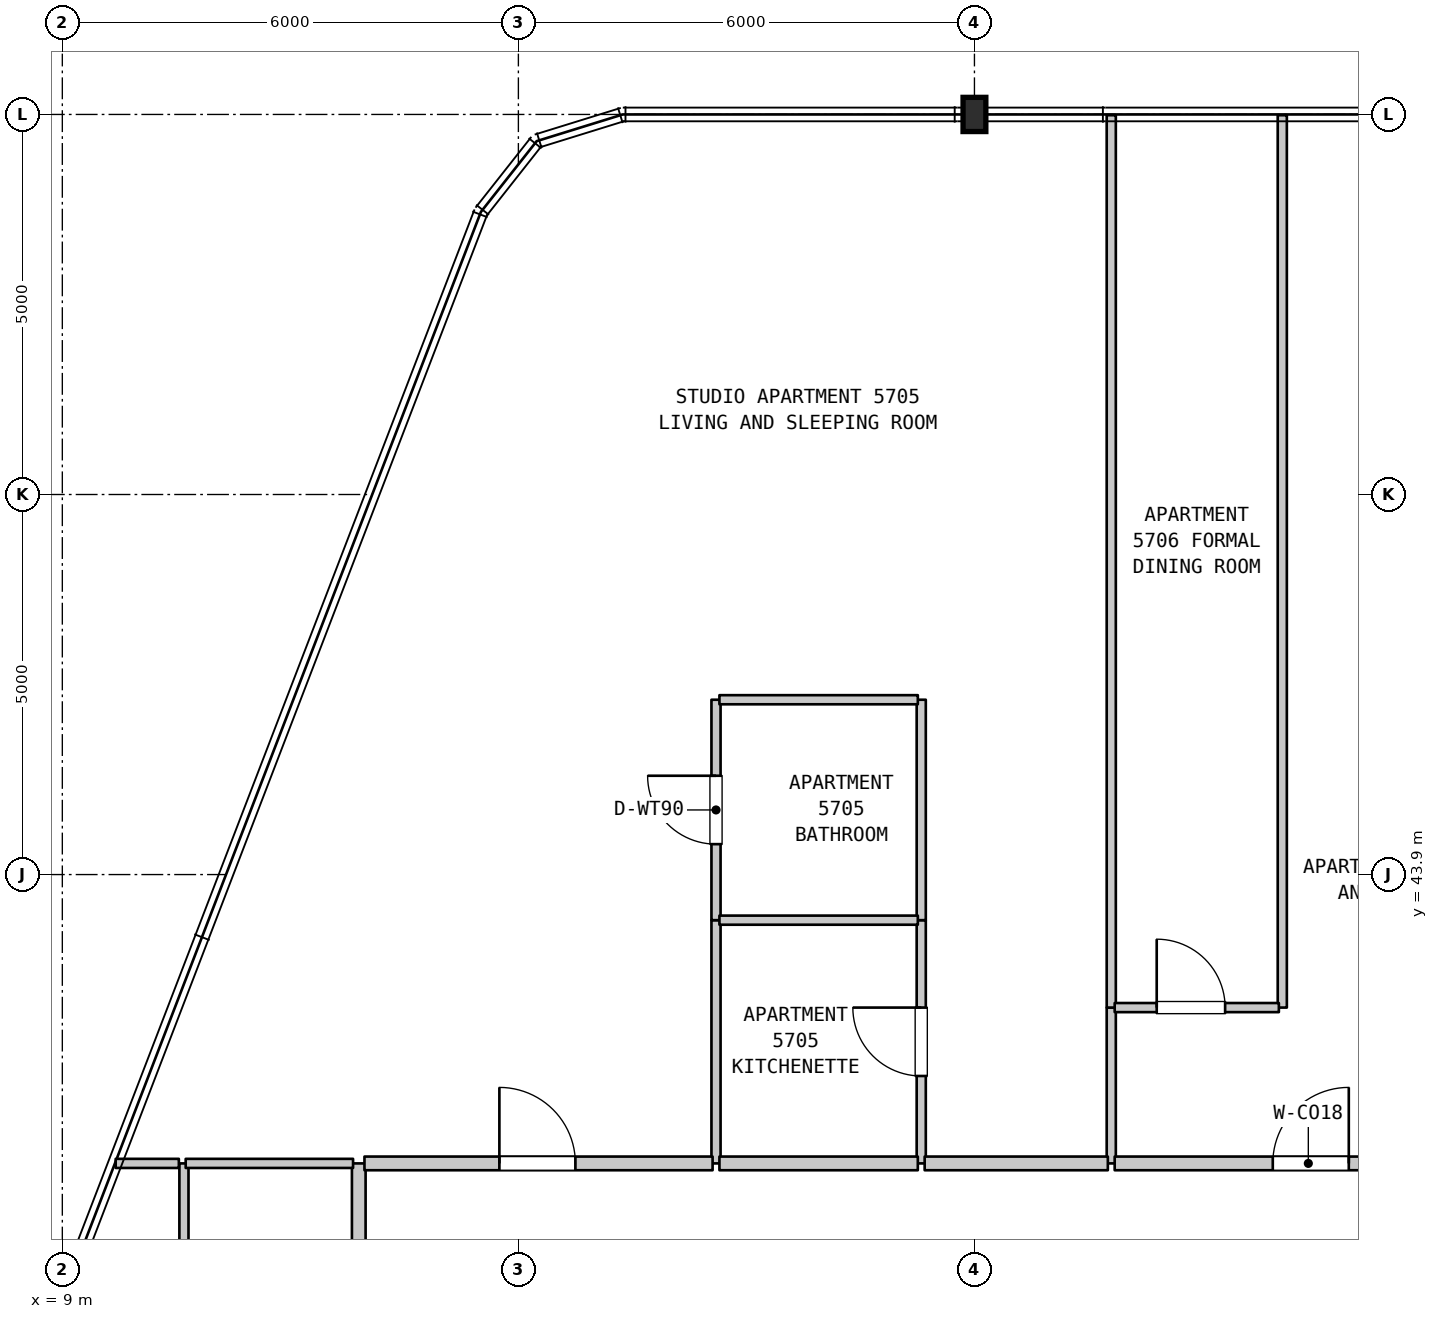
"""IFC4 building model, lengths in metres.
Left out: names, types, materials, properties, quantities, classifications, styles, units other than length and angle.
Written with IfcOpenShell. Run it as: python <this file> out.ifc"""

import sys

from ifc_helpers import new_model, si_unit, direction, frame, frame_2d, origin, origin_2d, place, context, subcontext, project, spatial, rectangle, i_section, extrude, element, fill, save


model = new_model("IFC4")
c1 = context("Model", 3, precision=1e-05, world=origin(), true_north=direction((0.0, 1.0)))
c2 = subcontext(c1, "Body", "Model", "MODEL_VIEW")
j1 = project(units=[si_unit("LENGTHUNIT", "METRE"), si_unit("PLANEANGLEUNIT", "RADIAN")], contexts=[c1])
p1 = place(None, origin())
s1 = spatial("IfcSite", under=j1, at=p1, CompositionType="ELEMENT")
p2 = place(p1, origin())
s2 = spatial("IfcBuilding", under=s1, at=p2, CompositionType="ELEMENT")
p3 = place(p2, frame((0.0, 0.0, 230.2)))
s3 = spatial("IfcBuildingStorey", under=s2, at=p3, CompositionType="ELEMENT", Elevation=230.2)
p4 = place(p3, frame((21.0, 53.9, 0.0), z_axis=(0.0, 0.0, 1.0), x_axis=(1.0, 0.0, 0.0)))
e1 = element("IfcColumn", 1, at=p4, inside=s3, PredefinedType="COLUMN", context=c2, shape_type="SweptSolid", body=[
    extrude(i_section(OverallWidth=0.3, OverallDepth=0.45, WebThickness=0.014, FlangeThickness=0.026, FilletRadius=0.027, at=origin_2d()), origin(), (0.0, 0.0, 1.0), 3.7),
])
p5 = place(p3, frame((10.6, 35.59, 0.0), z_axis=(0.0, 0.0, 1.0), x_axis=(0.0, 1.0, 0.0)))
e2 = element("IfcWall", 2, at=p5, inside=s3, PredefinedType="PARTITIONING", context=c2, shape_type="SweptSolid", body=[
    extrude(rectangle(XDim=4.51, YDim=0.12, at=frame_2d((2.255, 0.0))), origin(), (0.0, 0.0, 1.0), 3.39),
])
p6 = place(p3, frame((12.9, 35.59, 0.0), z_axis=(0.0, 0.0, 1.0), x_axis=(0.0, 1.0, 0.0)))
e3 = element("IfcWall", 3, at=p6, inside=s3, PredefinedType="STANDARD", context=c2, shape_type="SweptSolid", body=[
    extrude(rectangle(XDim=4.51, YDim=0.18, at=frame_2d((2.255, 0.0))), origin(), (0.0, 0.0, 1.0), 3.39),
])
p7 = place(p3, frame((17.6, 40.1, 0.0), z_axis=(0.0, 0.0, 1.0), x_axis=(0.0, 1.0, 0.0)))
e4 = element("IfcWall", 4, at=p7, inside=s3, PredefinedType="PARTITIONING", context=c2, shape_type="SweptSolid", body=[
    extrude(rectangle(XDim=3.2, YDim=0.12, at=frame_2d((1.6, 0.0))), origin(), (0.0, 0.0, 1.0), 3.39),
])
p8 = place(p3, frame((17.6, 43.3, 0.0), z_axis=(0.0, 0.0, 1.0), x_axis=(0.0, 1.0, 0.0)))
e5 = element("IfcWall", 5, at=p8, inside=s3, PredefinedType="PARTITIONING", context=c2, shape_type="SweptSolid", body=[
    extrude(rectangle(XDim=2.9, YDim=0.12, at=frame_2d((1.45, 0.0))), origin(), (0.0, 0.0, 1.0), 3.39),
])
p9 = place(p8, frame((1.0, 0.0, 0.0)))
e6 = element("IfcOpeningElement", 6, at=p9, cuts=e5, PredefinedType="OPENING", context=c2, shape_type="SweptSolid", body=[
    extrude(rectangle(XDim=0.9, YDim=2.1, at=frame_2d((0.45, 1.05))), frame((0.0, 0.07, 0.0), z_axis=(0.0, -1.0, 0.0), x_axis=(1.0, 0.0, 0.0)), (0.0, 0.0, 1.0), 0.14),
])
p10 = place(p3, frame((20.3, 40.1, 0.0), z_axis=(0.0, 0.0, 1.0), x_axis=(0.0, 1.0, 0.0)))
e7 = element("IfcWall", 7, at=p10, inside=s3, PredefinedType="PARTITIONING", context=c2, shape_type="SweptSolid", body=[
    extrude(rectangle(XDim=3.2, YDim=0.12, at=frame_2d((1.6, 0.0))), origin(), (0.0, 0.0, 1.0), 3.39),
])
p11 = place(p10, frame((1.15, 0.0, 0.0)))
e8 = element("IfcOpeningElement", 8, at=p11, cuts=e7, PredefinedType="OPENING", context=c2, shape_type="SweptSolid", body=[
    extrude(rectangle(XDim=0.9, YDim=2.15, at=frame_2d((0.45, 1.075))), frame((0.0, 0.07, 0.0), z_axis=(0.0, -1.0, 0.0), x_axis=(1.0, 0.0, 0.0)), (0.0, 0.0, 1.0), 0.14),
])
p12 = place(p3, frame((20.3, 43.3, 0.0), z_axis=(0.0, 0.0, 1.0), x_axis=(0.0, 1.0, 0.0)))
e9 = element("IfcWall", 9, at=p12, inside=s3, PredefinedType="PARTITIONING", context=c2, shape_type="SweptSolid", body=[
    extrude(rectangle(XDim=2.9, YDim=0.12, at=frame_2d((1.45, 0.0))), origin(), (0.0, 0.0, 1.0), 3.39),
])
p13 = place(p3, frame((22.8, 40.1, 0.0), z_axis=(0.0, 0.0, 1.0), x_axis=(0.0, 1.0, 0.0)))
e10 = element("IfcWall", 10, at=p13, inside=s3, PredefinedType="PARTITIONING", context=c2, shape_type="SweptSolid", body=[
    extrude(rectangle(XDim=2.05, YDim=0.12, at=frame_2d((1.025, 0.0))), origin(), (0.0, 0.0, 1.0), 3.39),
])
for number, where, z_axis, x_axis in (
    (11, (22.8, 42.15, 0.0), (0.0, 0.0, 1.0), (0.0, 1.0, 0.0)),
    (12, (25.05, 42.15, 0.0), (0.0, 0.0, 1.0), (0.0, 1.0, 0.0)),
):
    element("IfcWall", number, at=place(p3, frame(where, z_axis=z_axis, x_axis=x_axis)), inside=s3, PredefinedType="PARTITIONING", context=c2, shape_type="SweptSolid", body=[
        extrude(rectangle(XDim=11.74, YDim=0.12, at=frame_2d((5.87, 0.0))), origin(), (0.0, 0.0, 1.0), 3.39),
    ])
p14 = place(p3, frame((9.702, 40.1, 0.0), z_axis=(0.0, 0.0, 1.0), x_axis=(1.0, 0.0, 0.0)))
e13 = element("IfcWall", 13, at=p14, inside=s3, PredefinedType="PARTITIONING", context=c2, shape_type="SweptSolid", body=[
    extrude(rectangle(XDim=0.831, YDim=0.12, at=frame_2d((0.416, 0.0))), origin(), (0.0, 0.0, 1.0), 3.39),
])
p15 = place(p3, frame((10.623, 40.1, 0.0), z_axis=(0.0, 0.0, 1.0), x_axis=(1.0, 0.0, 0.0)))
e14 = element("IfcWall", 14, at=p15, inside=s3, PredefinedType="PARTITIONING", context=c2, shape_type="SweptSolid", body=[
    extrude(rectangle(XDim=2.202, YDim=0.12, at=frame_2d((1.101, 0.0))), origin(), (0.0, 0.0, 1.0), 3.39),
])
p16 = place(p3, frame((12.975, 40.1, 0.0), z_axis=(0.0, 0.0, 1.0), x_axis=(1.0, 0.0, 0.0)))
e15 = element("IfcWall", 15, at=p16, inside=s3, PredefinedType="STANDARD", context=c2, shape_type="SweptSolid", body=[
    extrude(rectangle(XDim=4.58, YDim=0.18, at=frame_2d((2.29, 0.0))), origin(), (0.0, 0.0, 1.0), 3.39),
])
p17 = place(p16, frame((1.775, 0.0, 0.0)))
e16 = element("IfcOpeningElement", 16, at=p17, cuts=e15, PredefinedType="OPENING", context=c2, shape_type="SweptSolid", body=[
    extrude(rectangle(XDim=1.0, YDim=2.15, at=frame_2d((0.5, 1.075))), frame((0.0, 0.1, 0.0), z_axis=(0.0, -1.0, 0.0), x_axis=(1.0, 0.0, 0.0)), (0.0, 0.0, 1.0), 0.2),
])
p18 = place(p3, frame((17.645, 40.1, 0.0), z_axis=(0.0, 0.0, 1.0), x_axis=(1.0, 0.0, 0.0)))
e17 = element("IfcWall", 17, at=p18, inside=s3, PredefinedType="STANDARD", context=c2, shape_type="SweptSolid", body=[
    extrude(rectangle(XDim=2.61, YDim=0.18, at=frame_2d((1.305, 0.0))), origin(), (0.0, 0.0, 1.0), 3.39),
])
p19 = place(p3, frame((20.345, 40.1, 0.0), z_axis=(0.0, 0.0, 1.0), x_axis=(1.0, 0.0, 0.0)))
e18 = element("IfcWall", 18, at=p19, inside=s3, PredefinedType="STANDARD", context=c2, shape_type="SweptSolid", body=[
    extrude(rectangle(XDim=2.41, YDim=0.18, at=frame_2d((1.205, 0.0))), origin(), (0.0, 0.0, 1.0), 3.39),
])
p20 = place(p3, frame((22.845, 40.1, 0.0), z_axis=(0.0, 0.0, 1.0), x_axis=(1.0, 0.0, 0.0)))
e19 = element("IfcWall", 19, at=p20, inside=s3, PredefinedType="STANDARD", context=c2, shape_type="SweptSolid", body=[
    extrude(rectangle(XDim=5.095, YDim=0.18, at=frame_2d((2.547, 0.0))), origin(), (0.0, 0.0, 1.0), 3.39),
])
p21 = place(p20, frame((2.08, 0.0, 0.0)))
e20 = element("IfcOpeningElement", 20, at=p21, cuts=e19, PredefinedType="OPENING", context=c2, shape_type="SweptSolid", body=[
    extrude(rectangle(XDim=1.0, YDim=2.15, at=frame_2d((0.5, 1.075))), frame((0.0, 0.1, 0.0), z_axis=(0.0, -1.0, 0.0), x_axis=(1.0, 0.0, 0.0)), (0.0, 0.0, 1.0), 0.2),
])
p22 = place(p3, frame((22.845, 42.15, 0.0), z_axis=(0.0, 0.0, 1.0), x_axis=(1.0, 0.0, 0.0)))
e21 = element("IfcWall", 21, at=p22, inside=s3, PredefinedType="PARTITIONING", context=c2, shape_type="SweptSolid", body=[
    extrude(rectangle(XDim=2.16, YDim=0.12, at=frame_2d((1.08, 0.0))), origin(), (0.0, 0.0, 1.0), 3.39),
])
p23 = place(p22, frame((0.553, 0.0, 0.0)))
e22 = element("IfcOpeningElement", 22, at=p23, cuts=e21, PredefinedType="OPENING", context=c2, shape_type="SweptSolid", body=[
    extrude(rectangle(XDim=0.9, YDim=2.15, at=frame_2d((0.45, 1.075))), frame((0.0, 0.07, 0.0), z_axis=(0.0, -1.0, 0.0), x_axis=(1.0, 0.0, 0.0)), (0.0, 0.0, 1.0), 0.14),
])
for number, where, z_axis, x_axis in (
    (23, (17.645, 43.3, 0.0), (0.0, 0.0, 1.0), (1.0, 0.0, 0.0)),
    (24, (17.645, 46.2, 0.0), (0.0, 0.0, 1.0), (1.0, 0.0, 0.0)),
):
    element("IfcWall", number, at=place(p3, frame(where, z_axis=z_axis, x_axis=x_axis)), inside=s3, PredefinedType="PARTITIONING", context=c2, shape_type="SweptSolid", body=[
        extrude(rectangle(XDim=2.61, YDim=0.12, at=frame_2d((1.305, 0.0))), origin(), (0.0, 0.0, 1.0), 3.39),
    ])
p24 = place(p9, origin())
e25 = element("IfcDoor", 25, at=p24, inside=s3, OperationType="SINGLE_SWING_RIGHT", PredefinedType="DOOR", context=c2, shape_type="SweptSolid", body=[
    extrude(rectangle(XDim=0.9, YDim=2.1, at=frame_2d((0.45, 1.05))), frame((0.0, 0.025, 0.0), z_axis=(0.0, -1.0, 0.0), x_axis=(1.0, 0.0, 0.0)), (0.0, 0.0, 1.0), 0.05),
])
fill(e6, e25)
p25 = place(p11, origin())
e26 = element("IfcDoor", 26, at=p25, inside=s3, OperationType="SINGLE_SWING_RIGHT", PredefinedType="DOOR", context=c2, shape_type="SweptSolid", body=[
    extrude(rectangle(XDim=0.9, YDim=2.15, at=frame_2d((0.45, 1.075))), frame((0.0, 0.025, 0.0), z_axis=(0.0, -1.0, 0.0), x_axis=(1.0, 0.0, 0.0)), (0.0, 0.0, 1.0), 0.05),
])
fill(e8, e26)
p26 = place(p17, origin())
e27 = element("IfcDoor", 27, at=p26, inside=s3, OperationType="SINGLE_SWING_LEFT", PredefinedType="DOOR", context=c2, shape_type="SweptSolid", body=[
    extrude(rectangle(XDim=1.0, YDim=2.15, at=frame_2d((0.5, 1.075))), frame((0.0, 0.025, 0.0), z_axis=(0.0, -1.0, 0.0), x_axis=(1.0, 0.0, 0.0)), (0.0, 0.0, 1.0), 0.05),
])
fill(e16, e27)
p27 = place(p21, origin())
e28 = element("IfcDoor", 28, at=p27, inside=s3, OperationType="SINGLE_SWING_RIGHT", PredefinedType="DOOR", context=c2, shape_type="SweptSolid", body=[
    extrude(rectangle(XDim=1.0, YDim=2.15, at=frame_2d((0.5, 1.075))), frame((0.0, 0.025, 0.0), z_axis=(0.0, -1.0, 0.0), x_axis=(1.0, 0.0, 0.0)), (0.0, 0.0, 1.0), 0.05),
])
fill(e20, e28)
p28 = place(p23, origin())
e29 = element("IfcDoor", 29, at=p28, inside=s3, OperationType="SINGLE_SWING_LEFT", PredefinedType="DOOR", context=c2, shape_type="SweptSolid", body=[
    extrude(rectangle(XDim=0.9, YDim=2.15, at=frame_2d((0.45, 1.075))), frame((0.0, 0.025, 0.0), z_axis=(0.0, -1.0, 0.0), x_axis=(1.0, 0.0, 0.0)), (0.0, 0.0, 1.0), 0.05),
])
fill(e22, e29)
save(model, sys.argv[1])
